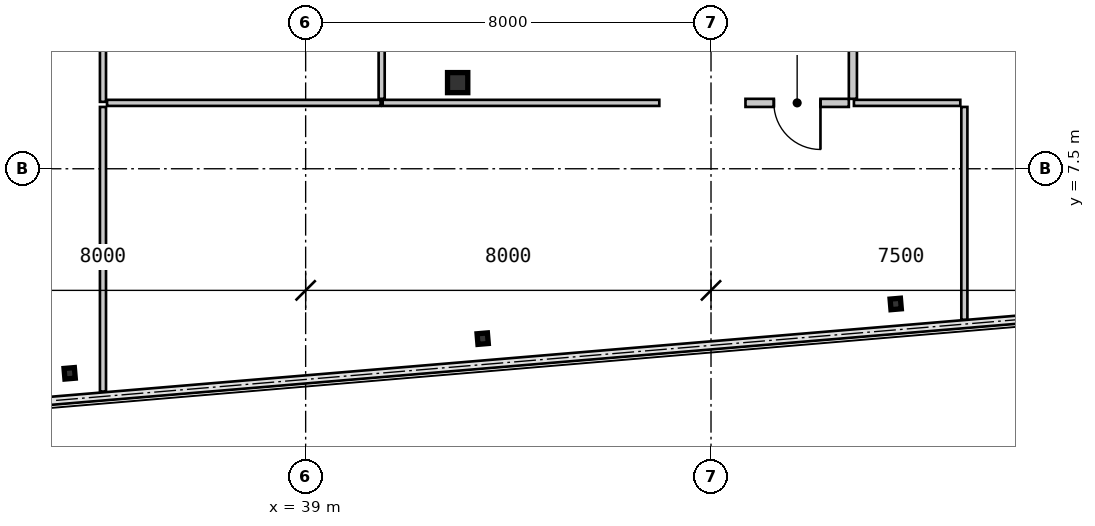
"""IFC4 building model, lengths in metres.
Left out: names, types, materials, properties, quantities, classifications, styles, units other than length and angle.
Written with IfcOpenShell. Run it as: python <this file> out.ifc"""

import sys

from ifc_helpers import new_model, si_unit, direction, frame, frame_2d, origin, origin_2d, place, context, subcontext, project, spatial, rectangle, i_section, extrude, source, transform, mapped, element, fill, save


model = new_model("IFC4")
c1 = context("Model", 3, precision=1e-05, world=origin(), true_north=direction((0.0, 1.0)))
c2 = subcontext(c1, "Body", "Model", "MODEL_VIEW")
j1 = project(units=[si_unit("LENGTHUNIT", "METRE"), si_unit("PLANEANGLEUNIT", "RADIAN")], contexts=[c1])
p1 = place(None, origin())
s1 = spatial("IfcSite", under=j1, at=p1, CompositionType="ELEMENT")
p2 = place(p1, origin())
s2 = spatial("IfcBuilding", under=s1, at=p2, CompositionType="ELEMENT")
p3 = place(p2, frame((0.0, 0.0, 191.45)))
s3 = spatial("IfcBuildingStorey", under=s2, at=p3, CompositionType="ELEMENT", Elevation=191.45)
m1 = source(origin(), c2, "Body", "SweptSolid", [
    extrude(i_section(OverallWidth=0.4, OverallDepth=0.396, WebThickness=0.022, FlangeThickness=0.034, at=origin_2d()), origin(), (0.0, 0.0, 1.0), 3.15),
])
p4 = place(p3, frame((42.0, 9.2, 0.0), z_axis=(0.0, 0.0, 1.0), x_axis=(1.0, 0.0, 0.0)))
e1 = element("IfcColumn", 1, at=p4, inside=s3, PredefinedType="COLUMN", context=c2, shape_type="MappedRepresentation", body=[
    mapped(m1, transform((0.0, 0.0, 0.0), scale=1.0)),
])
m2 = source(origin(), c2, "Body", "SweptSolid", [
    extrude(i_section(OverallWidth=0.205, OverallDepth=0.21, WebThickness=0.009, FlangeThickness=0.014, at=origin_2d()), origin(), (0.0, 0.0, 1.0), 3.15),
])
for number, where, z_axis, x_axis in (
    (2, (34.342, 3.463, 0.0), (0.0, 0.0, 1.0), (0.996, 0.084, 0.0)),
    (3, (42.494, 4.147, 0.0), (0.0, 0.0, 1.0), (0.996, 0.084, 0.0)),
    (4, (50.645, 4.832, 0.0), (0.0, 0.0, 1.0), (0.996, 0.084, 0.0)),
):
    element("IfcColumn", number, at=place(p3, frame(where, z_axis=z_axis, x_axis=x_axis)), inside=s3, PredefinedType="COLUMN", context=c2, shape_type="MappedRepresentation", body=[
        mapped(m2, transform((0.0, 0.0, 0.0), scale=1.0)),
    ])
m3 = source(origin(), c2, "Body", "SweptSolid", [
    extrude(rectangle(XDim=2.04, YDim=0.16, at=frame_2d((1.02, 0.0))), origin(), (0.0, 0.0, 1.0), 2.93),
])
p5 = place(p3, frame((49.72, 8.8, 0.0), z_axis=(0.0, 0.0, 1.0), x_axis=(-1.0, 0.0, 0.0)))
e5 = element("IfcWall", 5, at=p5, inside=s3, PredefinedType="PARTITIONING", context=c2, shape_type="MappedRepresentation", body=[
    mapped(m3, transform((0.0, 0.0, 0.0), scale=1.0)),
])
m4 = source(origin(), c2, "Body", "SweptSolid", [
    extrude(rectangle(XDim=0.92, YDim=2.1, at=frame_2d((0.46, 1.05))), frame((0.0, 0.09, 0.0), z_axis=(0.0, -1.0, 0.0), x_axis=(1.0, 0.0, 0.0)), (0.0, 0.0, 1.0), 0.18),
])
p6 = place(p5, frame((0.56, 0.0, 0.0)))
e6 = element("IfcOpeningElement", 6, at=p6, cuts=e5, PredefinedType="OPENING", context=c2, shape_type="MappedRepresentation", body=[
    mapped(m4, transform((0.0, 0.0, 0.0), scale=1.0)),
])
m5 = source(origin(), c2, "Body", "SweptSolid", [
    extrude(rectangle(XDim=12.84, YDim=0.16, at=frame_2d((6.42, 0.0))), origin(), (0.0, 0.0, 1.0), 2.93),
])
p7 = place(p3, frame((49.8, 21.72, 0.0), z_axis=(0.0, 0.0, 1.0), x_axis=(0.0, -1.0, 0.0)))
e7 = element("IfcWall", 7, at=p7, inside=s3, PredefinedType="PARTITIONING", context=c2, shape_type="MappedRepresentation", body=[
    mapped(m5, transform((0.0, 0.0, 0.0), scale=1.0)),
])
p8 = place(p7, frame((5.93, 0.0, 0.0)))
e8 = element("IfcOpeningElement", 8, at=p8, cuts=e7, PredefinedType="OPENING", context=c2, shape_type="MappedRepresentation", body=[
    mapped(m4, transform((0.0, 0.0, 0.0), scale=1.0)),
])
m6 = source(origin(), c2, "Body", "SweptSolid", [
    extrude(rectangle(XDim=5.616, YDim=0.12, at=frame_2d((2.808, 0.0))), origin(), (0.0, 0.0, 1.0), 2.93),
])
p9 = place(p3, frame((35.0, 3.104, 0.0), z_axis=(0.0, 0.0, 1.0), x_axis=(0.0, 1.0, 0.0)))
e9 = element("IfcWall", 9, at=p9, inside=s3, PredefinedType="PARTITIONING", context=c2, shape_type="MappedRepresentation", body=[
    mapped(m6, transform((0.0, 0.0, 0.0), scale=1.0)),
])
m7 = source(origin(), c2, "Body", "SweptSolid", [
    extrude(rectangle(XDim=5.4, YDim=0.12, at=frame_2d((2.7, 0.0))), origin(), (0.0, 0.0, 1.0), 2.93),
])
p10 = place(p3, frame((35.08, 8.8, 0.0), z_axis=(0.0, 0.0, 1.0), x_axis=(1.0, 0.0, 0.0)))
e10 = element("IfcWall", 10, at=p10, inside=s3, PredefinedType="PARTITIONING", context=c2, shape_type="MappedRepresentation", body=[
    mapped(m7, transform((0.0, 0.0, 0.0), scale=1.0)),
])
m8 = source(origin(), c2, "Body", "SweptSolid", [
    extrude(rectangle(XDim=5.459, YDim=0.12, at=frame_2d((2.73, 0.0))), origin(), (0.0, 0.0, 1.0), 2.93),
])
p11 = place(p3, frame((40.52, 8.8, 0.0), z_axis=(0.0, 0.0, 1.0), x_axis=(1.0, 0.0, 0.0)))
e11 = element("IfcWall", 11, at=p11, inside=s3, PredefinedType="PARTITIONING", context=c2, shape_type="MappedRepresentation", body=[
    mapped(m8, transform((0.0, 0.0, 0.0), scale=1.0)),
])
m9 = source(origin(), c2, "Body", "SweptSolid", [
    extrude(rectangle(XDim=4.202, YDim=0.12, at=frame_2d((2.101, 0.0))), origin(), (0.0, 0.0, 1.0), 2.93),
])
p12 = place(p3, frame((52.0, 8.72, 0.0), z_axis=(0.0, 0.0, 1.0), x_axis=(0.0, -1.0, 0.0)))
e12 = element("IfcWall", 12, at=p12, inside=s3, PredefinedType="PARTITIONING", context=c2, shape_type="MappedRepresentation", body=[
    mapped(m9, transform((0.0, 0.0, 0.0), scale=1.0)),
])
m10 = source(origin(), c2, "Body", "SweptSolid", [
    extrude(rectangle(XDim=2.1, YDim=0.12, at=frame_2d((1.05, 0.0))), origin(), (0.0, 0.0, 1.0), 2.93),
])
p13 = place(p3, frame((49.82, 8.8, 0.0), z_axis=(0.0, 0.0, 1.0), x_axis=(1.0, 0.0, 0.0)))
e13 = element("IfcWall", 13, at=p13, inside=s3, PredefinedType="PARTITIONING", context=c2, shape_type="MappedRepresentation", body=[
    mapped(m10, transform((0.0, 0.0, 0.0), scale=1.0)),
])
m11 = source(origin(), c2, "Body", "SweptSolid", [
    extrude(rectangle(XDim=12.898, YDim=0.12, at=frame_2d((6.449, 0.0))), origin(), (0.0, 0.0, 1.0), 2.93),
])
p14 = place(p3, frame((35.0, 21.718, 0.0), z_axis=(0.0, 0.0, 1.0), x_axis=(0.0, -1.0, 0.0)))
e14 = element("IfcWall", 14, at=p14, inside=s3, PredefinedType="PARTITIONING", context=c2, shape_type="MappedRepresentation", body=[
    mapped(m11, transform((0.0, 0.0, 0.0), scale=1.0)),
])
m12 = source(origin(), c2, "Body", "SweptSolid", [
    extrude(rectangle(XDim=7.318, YDim=0.12, at=frame_2d((3.659, 0.0))), origin(), (0.0, 0.0, 1.0), 2.93),
])
p15 = place(p3, frame((40.5, 16.198, 0.0), z_axis=(0.0, 0.0, 1.0), x_axis=(0.0, -1.0, 0.0)))
e15 = element("IfcWall", 15, at=p15, inside=s3, PredefinedType="PARTITIONING", context=c2, shape_type="MappedRepresentation", body=[
    mapped(m12, transform((0.0, 0.0, 0.0), scale=1.0)),
])
m13 = source(origin(), c2, "Body", "SweptSolid", [
    extrude(rectangle(XDim=0.92, YDim=2.1, at=frame_2d((0.46, 1.05))), frame((0.0, 0.025, 0.0), z_axis=(0.0, -1.0, 0.0), x_axis=(1.0, 0.0, 0.0)), (0.0, 0.0, 1.0), 0.05),
])
p16 = place(p6, origin())
e16 = element("IfcDoor", 16, at=p16, inside=s3, OperationType="SINGLE_SWING_LEFT", PredefinedType="DOOR", context=c2, shape_type="MappedRepresentation", body=[
    mapped(m13, transform((0.0, 0.0, 0.0), scale=1.0)),
])
fill(e6, e16)
save(model, sys.argv[1])
